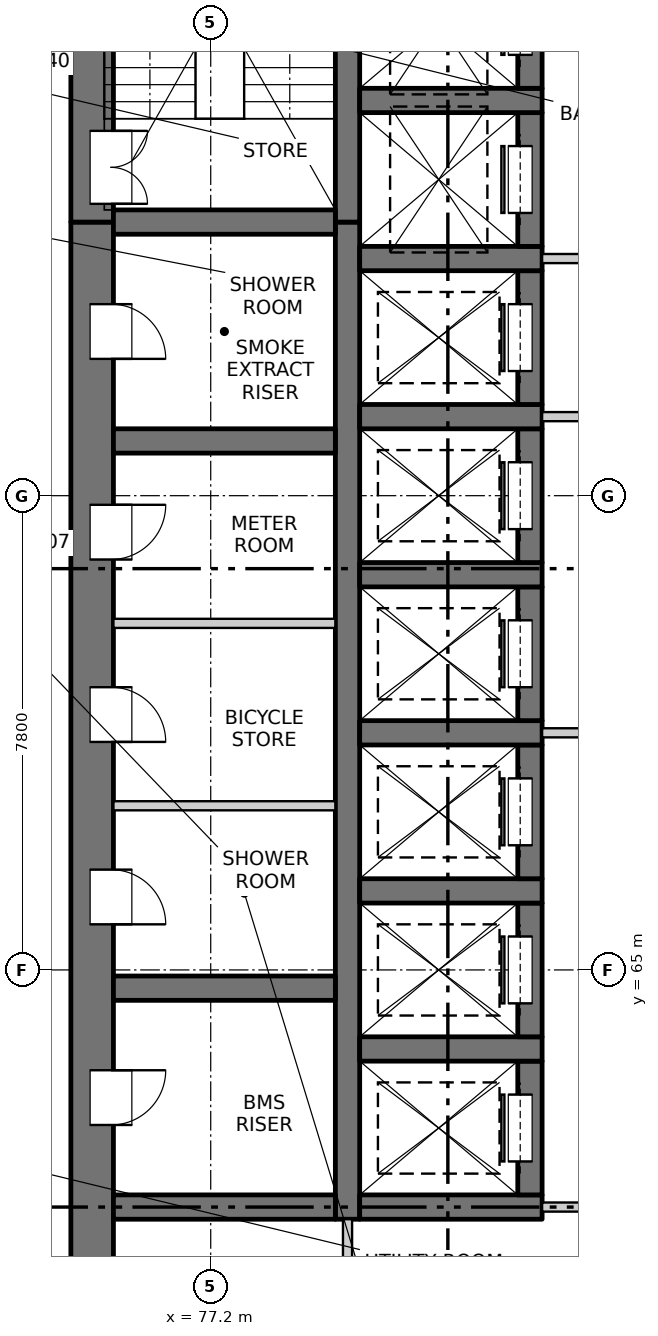
"""IFC4 building model, lengths in metres.
Left out: names, types, materials, properties, quantities, classifications, styles, units other than length and angle.
Written with IfcOpenShell. Run it as: python <this file> out.ifc"""

import sys

from ifc_helpers import new_model, si_unit, direction, frame, frame_2d, origin, place, context, subcontext, project, spatial, rectangle, extrude, element, fill, save


model = new_model("IFC4")
c1 = context("Model", 3, precision=1e-05, world=origin(), true_north=direction((0.0, 1.0)))
c2 = subcontext(c1, "Body", "Model", "MODEL_VIEW")
j1 = project(units=[si_unit("LENGTHUNIT", "METRE"), si_unit("PLANEANGLEUNIT", "RADIAN")], contexts=[c1])
p1 = place(None, origin())
s1 = spatial("IfcSite", under=j1, at=p1, CompositionType="ELEMENT")
p2 = place(p1, origin())
s2 = spatial("IfcBuilding", under=s1, at=p2, CompositionType="ELEMENT")
p3 = place(p2, frame((0.0, 0.0, 29.7)))
s3 = spatial("IfcBuildingStorey", under=s2, at=p3, CompositionType="ELEMENT", Elevation=29.7)
p4 = place(p3, frame((75.25, 54.9, -0.25), z_axis=(0.0, 0.0, 1.0), x_axis=(0.0, 1.0, 0.0)))
e1 = element("IfcWall", 1, at=p4, inside=s3, PredefinedType="SOLIDWALL", context=c2, shape_type="SweptSolid", body=[
    extrude(rectangle(XDim=22.4, YDim=0.7, at=frame_2d((11.2, 0.0))), origin(), (0.0, 0.0, 1.0), 3.4),
])
p5 = place(p4, frame((7.55, 0.0, 0.25)))
e2 = element("IfcOpeningElement", 2, at=p5, cuts=e1, PredefinedType="OPENING", context=c2, shape_type="SweptSolid", body=[
    extrude(rectangle(XDim=0.9, YDim=2.1, at=frame_2d((0.45, 1.05))), frame((0.0, 0.36, 0.0), z_axis=(0.0, -1.0, 0.0), x_axis=(1.0, 0.0, 0.0)), (0.0, 0.0, 1.0), 0.72),
])
p6 = place(p4, frame((10.85, 0.0, 0.25)))
e3 = element("IfcOpeningElement", 3, at=p6, cuts=e1, PredefinedType="OPENING", context=c2, shape_type="SweptSolid", body=[
    extrude(rectangle(XDim=0.9, YDim=2.1, at=frame_2d((0.45, 1.05))), frame((0.0, 0.36, 0.0), z_axis=(0.0, -1.0, 0.0), x_axis=(1.0, 0.0, 0.0)), (0.0, 0.0, 1.0), 0.72),
])
p7 = place(p4, frame((13.85, 0.0, 0.25)))
e4 = element("IfcOpeningElement", 4, at=p7, cuts=e1, PredefinedType="OPENING", context=c2, shape_type="SweptSolid", body=[
    extrude(rectangle(XDim=0.9, YDim=2.1, at=frame_2d((0.45, 1.05))), frame((0.0, 0.36, 0.0), z_axis=(0.0, -1.0, 0.0), x_axis=(1.0, 0.0, 0.0)), (0.0, 0.0, 1.0), 0.72),
])
p8 = place(p4, frame((16.85, 0.0, 0.25)))
e5 = element("IfcOpeningElement", 5, at=p8, cuts=e1, PredefinedType="OPENING", context=c2, shape_type="SweptSolid", body=[
    extrude(rectangle(XDim=0.9, YDim=2.1, at=frame_2d((0.45, 1.05))), frame((0.0, 0.36, 0.0), z_axis=(0.0, -1.0, 0.0), x_axis=(1.0, 0.0, 0.0)), (0.0, 0.0, 1.0), 0.72),
])
p9 = place(p4, frame((20.15, 0.0, 0.25)))
e6 = element("IfcOpeningElement", 6, at=p9, cuts=e1, PredefinedType="OPENING", context=c2, shape_type="SweptSolid", body=[
    extrude(rectangle(XDim=0.9, YDim=2.1, at=frame_2d((0.45, 1.05))), frame((0.0, 0.36, 0.0), z_axis=(0.0, -1.0, 0.0), x_axis=(1.0, 0.0, 0.0)), (0.0, 0.0, 1.0), 0.72),
])
p10 = place(p3, frame((75.25, 77.3, -0.25), z_axis=(0.0, 0.0, 1.0), x_axis=(0.0, 1.0, 0.0)))
e7 = element("IfcWall", 7, at=p10, inside=s3, PredefinedType="SOLIDWALL", context=c2, shape_type="SweptSolid", body=[
    extrude(rectangle(XDim=7.55, YDim=0.7, at=frame_2d((3.775, 0.0))), origin(), (0.0, 0.0, 1.0), 3.4),
])
p11 = place(p10, frame((0.3, 0.0, 0.25)))
e8 = element("IfcOpeningElement", 8, at=p11, cuts=e7, PredefinedType="OPENING", context=c2, shape_type="SweptSolid", body=[
    extrude(rectangle(XDim=1.2, YDim=2.1, at=frame_2d((0.6, 1.05))), frame((0.0, 0.36, 0.0), z_axis=(0.0, -1.0, 0.0), x_axis=(1.0, 0.0, 0.0)), (0.0, 0.0, 1.0), 0.72),
])
p12 = place(p3, frame((79.45, 60.9, -0.25), z_axis=(0.0, 0.0, 1.0), x_axis=(0.0, 1.0, 0.0)))
e9 = element("IfcWall", 9, at=p12, inside=s3, PredefinedType="SOLIDWALL", context=c2, shape_type="SweptSolid", body=[
    extrude(rectangle(XDim=16.4, YDim=0.4, at=frame_2d((8.2, 0.0))), origin(), (0.0, 0.0, 1.0), 3.4),
])
p13 = place(p3, frame((79.45, 77.3, -0.25), z_axis=(0.0, 0.0, 1.0), x_axis=(0.0, 1.0, 0.0)))
e10 = element("IfcWall", 10, at=p13, inside=s3, PredefinedType="SOLIDWALL", context=c2, shape_type="SweptSolid", body=[
    extrude(rectangle(XDim=6.85, YDim=0.4, at=frame_2d((3.425, 0.0))), origin(), (0.0, 0.0, 1.0), 3.4),
])
p14 = place(p3, frame((79.65, 61.1, -0.25), z_axis=(0.0, 0.0, 1.0), x_axis=(1.0, 0.0, 0.0)))
e11 = element("IfcWall", 11, at=p14, inside=s3, PredefinedType="SOLIDWALL", context=c2, shape_type="SweptSolid", body=[
    extrude(rectangle(XDim=3.0, YDim=0.4, at=frame_2d((1.5, 0.0))), origin(), (0.0, 0.0, 1.0), 3.4),
])
p15 = place(p3, frame((82.45, 61.3, -0.25), z_axis=(0.0, 0.0, 1.0), x_axis=(0.0, 1.0, 0.0)))
e12 = element("IfcWall", 12, at=p15, inside=s3, PredefinedType="SOLIDWALL", context=c2, shape_type="SweptSolid", body=[
    extrude(rectangle(XDim=2.2, YDim=0.4, at=frame_2d((1.1, 0.0))), origin(), (0.0, 0.0, 1.0), 3.4),
])
p16 = place(p15, frame((0.55, 0.0, 0.25)))
e13 = element("IfcOpeningElement", 13, at=p16, cuts=e12, PredefinedType="OPENING", context=c2, shape_type="SweptSolid", body=[
    extrude(rectangle(XDim=1.1, YDim=2.1, at=frame_2d((0.55, 1.05))), frame((0.0, 0.21, 0.0), z_axis=(0.0, -1.0, 0.0), x_axis=(1.0, 0.0, 0.0)), (0.0, 0.0, 1.0), 0.42),
])
p17 = place(p3, frame((79.65, 63.7, -0.25), z_axis=(0.0, 0.0, 1.0), x_axis=(1.0, 0.0, 0.0)))
e14 = element("IfcWall", 14, at=p17, inside=s3, PredefinedType="SOLIDWALL", context=c2, shape_type="SweptSolid", body=[
    extrude(rectangle(XDim=3.0, YDim=0.4, at=frame_2d((1.5, 0.0))), origin(), (0.0, 0.0, 1.0), 3.4),
])
p18 = place(p3, frame((82.45, 63.9, -0.25), z_axis=(0.0, 0.0, 1.0), x_axis=(0.0, 1.0, 0.0)))
e15 = element("IfcWall", 15, at=p18, inside=s3, PredefinedType="SOLIDWALL", context=c2, shape_type="SweptSolid", body=[
    extrude(rectangle(XDim=2.2, YDim=0.4, at=frame_2d((1.1, 0.0))), origin(), (0.0, 0.0, 1.0), 3.4),
])
p19 = place(p18, frame((0.55, 0.0, 0.25)))
e16 = element("IfcOpeningElement", 16, at=p19, cuts=e15, PredefinedType="OPENING", context=c2, shape_type="SweptSolid", body=[
    extrude(rectangle(XDim=1.1, YDim=2.1, at=frame_2d((0.55, 1.05))), frame((0.0, 0.21, 0.0), z_axis=(0.0, -1.0, 0.0), x_axis=(1.0, 0.0, 0.0)), (0.0, 0.0, 1.0), 0.42),
])
p20 = place(p3, frame((79.65, 66.3, -0.25), z_axis=(0.0, 0.0, 1.0), x_axis=(1.0, 0.0, 0.0)))
e17 = element("IfcWall", 17, at=p20, inside=s3, PredefinedType="SOLIDWALL", context=c2, shape_type="SweptSolid", body=[
    extrude(rectangle(XDim=3.0, YDim=0.4, at=frame_2d((1.5, 0.0))), origin(), (0.0, 0.0, 1.0), 3.4),
])
p21 = place(p3, frame((82.45, 66.5, -0.25), z_axis=(0.0, 0.0, 1.0), x_axis=(0.0, 1.0, 0.0)))
e18 = element("IfcWall", 18, at=p21, inside=s3, PredefinedType="SOLIDWALL", context=c2, shape_type="SweptSolid", body=[
    extrude(rectangle(XDim=2.2, YDim=0.4, at=frame_2d((1.1, 0.0))), origin(), (0.0, 0.0, 1.0), 3.4),
])
p22 = place(p21, frame((0.55, 0.0, 0.25)))
e19 = element("IfcOpeningElement", 19, at=p22, cuts=e18, PredefinedType="OPENING", context=c2, shape_type="SweptSolid", body=[
    extrude(rectangle(XDim=1.1, YDim=2.1, at=frame_2d((0.55, 1.05))), frame((0.0, 0.21, 0.0), z_axis=(0.0, -1.0, 0.0), x_axis=(1.0, 0.0, 0.0)), (0.0, 0.0, 1.0), 0.42),
])
p23 = place(p3, frame((79.65, 68.9, -0.25), z_axis=(0.0, 0.0, 1.0), x_axis=(1.0, 0.0, 0.0)))
e20 = element("IfcWall", 20, at=p23, inside=s3, PredefinedType="SOLIDWALL", context=c2, shape_type="SweptSolid", body=[
    extrude(rectangle(XDim=3.0, YDim=0.4, at=frame_2d((1.5, 0.0))), origin(), (0.0, 0.0, 1.0), 3.4),
])
p24 = place(p3, frame((82.45, 69.1, -0.25), z_axis=(0.0, 0.0, 1.0), x_axis=(0.0, 1.0, 0.0)))
e21 = element("IfcWall", 21, at=p24, inside=s3, PredefinedType="SOLIDWALL", context=c2, shape_type="SweptSolid", body=[
    extrude(rectangle(XDim=2.2, YDim=0.4, at=frame_2d((1.1, 0.0))), origin(), (0.0, 0.0, 1.0), 3.4),
])
p25 = place(p24, frame((0.55, 0.0, 0.25)))
e22 = element("IfcOpeningElement", 22, at=p25, cuts=e21, PredefinedType="OPENING", context=c2, shape_type="SweptSolid", body=[
    extrude(rectangle(XDim=1.1, YDim=2.1, at=frame_2d((0.55, 1.05))), frame((0.0, 0.21, 0.0), z_axis=(0.0, -1.0, 0.0), x_axis=(1.0, 0.0, 0.0)), (0.0, 0.0, 1.0), 0.42),
])
p26 = place(p3, frame((79.65, 71.5, -0.25), z_axis=(0.0, 0.0, 1.0), x_axis=(1.0, 0.0, 0.0)))
e23 = element("IfcWall", 23, at=p26, inside=s3, PredefinedType="SOLIDWALL", context=c2, shape_type="SweptSolid", body=[
    extrude(rectangle(XDim=3.0, YDim=0.4, at=frame_2d((1.5, 0.0))), origin(), (0.0, 0.0, 1.0), 3.4),
])
p27 = place(p3, frame((82.45, 71.7, -0.25), z_axis=(0.0, 0.0, 1.0), x_axis=(0.0, 1.0, 0.0)))
e24 = element("IfcWall", 24, at=p27, inside=s3, PredefinedType="SOLIDWALL", context=c2, shape_type="SweptSolid", body=[
    extrude(rectangle(XDim=2.2, YDim=0.4, at=frame_2d((1.1, 0.0))), origin(), (0.0, 0.0, 1.0), 3.4),
])
p28 = place(p27, frame((0.55, 0.0, 0.25)))
e25 = element("IfcOpeningElement", 25, at=p28, cuts=e24, PredefinedType="OPENING", context=c2, shape_type="SweptSolid", body=[
    extrude(rectangle(XDim=1.1, YDim=2.1, at=frame_2d((0.55, 1.05))), frame((0.0, 0.21, 0.0), z_axis=(0.0, -1.0, 0.0), x_axis=(1.0, 0.0, 0.0)), (0.0, 0.0, 1.0), 0.42),
])
p29 = place(p3, frame((79.65, 74.1, -0.25), z_axis=(0.0, 0.0, 1.0), x_axis=(1.0, 0.0, 0.0)))
e26 = element("IfcWall", 26, at=p29, inside=s3, PredefinedType="SOLIDWALL", context=c2, shape_type="SweptSolid", body=[
    extrude(rectangle(XDim=3.0, YDim=0.4, at=frame_2d((1.5, 0.0))), origin(), (0.0, 0.0, 1.0), 3.4),
])
p30 = place(p3, frame((82.45, 74.3, -0.25), z_axis=(0.0, 0.0, 1.0), x_axis=(0.0, 1.0, 0.0)))
e27 = element("IfcWall", 27, at=p30, inside=s3, PredefinedType="SOLIDWALL", context=c2, shape_type="SweptSolid", body=[
    extrude(rectangle(XDim=2.2, YDim=0.4, at=frame_2d((1.1, 0.0))), origin(), (0.0, 0.0, 1.0), 3.4),
])
p31 = place(p30, frame((0.55, 0.0, 0.25)))
e28 = element("IfcOpeningElement", 28, at=p31, cuts=e27, PredefinedType="OPENING", context=c2, shape_type="SweptSolid", body=[
    extrude(rectangle(XDim=1.1, YDim=2.1, at=frame_2d((0.55, 1.05))), frame((0.0, 0.21, 0.0), z_axis=(0.0, -1.0, 0.0), x_axis=(1.0, 0.0, 0.0)), (0.0, 0.0, 1.0), 0.42),
])
p32 = place(p3, frame((79.65, 76.7, -0.25), z_axis=(0.0, 0.0, 1.0), x_axis=(1.0, 0.0, 0.0)))
e29 = element("IfcWall", 29, at=p32, inside=s3, PredefinedType="SOLIDWALL", context=c2, shape_type="SweptSolid", body=[
    extrude(rectangle(XDim=3.0, YDim=0.4, at=frame_2d((1.5, 0.0))), origin(), (0.0, 0.0, 1.0), 3.4),
])
p33 = place(p3, frame((82.45, 76.9, -0.25), z_axis=(0.0, 0.0, 1.0), x_axis=(0.0, 1.0, 0.0)))
e30 = element("IfcWall", 30, at=p33, inside=s3, PredefinedType="SOLIDWALL", context=c2, shape_type="SweptSolid", body=[
    extrude(rectangle(XDim=2.2, YDim=0.4, at=frame_2d((1.1, 0.0))), origin(), (0.0, 0.0, 1.0), 3.4),
])
p34 = place(p33, frame((0.55, 0.0, 0.25)))
e31 = element("IfcOpeningElement", 31, at=p34, cuts=e30, PredefinedType="OPENING", context=c2, shape_type="SweptSolid", body=[
    extrude(rectangle(XDim=1.1, YDim=2.1, at=frame_2d((0.55, 1.05))), frame((0.0, 0.21, 0.0), z_axis=(0.0, -1.0, 0.0), x_axis=(1.0, 0.0, 0.0)), (0.0, 0.0, 1.0), 0.42),
])
p35 = place(p3, frame((79.65, 79.3, -0.25), z_axis=(0.0, 0.0, 1.0), x_axis=(1.0, 0.0, 0.0)))
e32 = element("IfcWall", 32, at=p35, inside=s3, PredefinedType="SOLIDWALL", context=c2, shape_type="SweptSolid", body=[
    extrude(rectangle(XDim=3.0, YDim=0.4, at=frame_2d((1.5, 0.0))), origin(), (0.0, 0.0, 1.0), 3.4),
])
p36 = place(p3, frame((82.45, 79.5, -0.25), z_axis=(0.0, 0.0, 1.0), x_axis=(0.0, 1.0, 0.0)))
e33 = element("IfcWall", 33, at=p36, inside=s3, PredefinedType="SOLIDWALL", context=c2, shape_type="SweptSolid", body=[
    extrude(rectangle(XDim=2.2, YDim=0.4, at=frame_2d((1.1, 0.0))), origin(), (0.0, 0.0, 1.0), 3.4),
])
p37 = place(p36, frame((0.55, 0.0, 0.25)))
e34 = element("IfcOpeningElement", 34, at=p37, cuts=e33, PredefinedType="OPENING", context=c2, shape_type="SweptSolid", body=[
    extrude(rectangle(XDim=1.1, YDim=2.1, at=frame_2d((0.55, 1.05))), frame((0.0, 0.21, 0.0), z_axis=(0.0, -1.0, 0.0), x_axis=(1.0, 0.0, 0.0)), (0.0, 0.0, 1.0), 0.42),
])
for number, where, z_axis, x_axis in (
    (35, (75.6, 61.1, -0.25), (0.0, 0.0, 1.0), (1.0, 0.0, 0.0)),
    (36, (75.6, 64.7, -0.25), (0.0, 0.0, 1.0), (1.0, 0.0, 0.0)),
    (37, (75.6, 73.7, -0.25), (0.0, 0.0, 1.0), (1.0, 0.0, 0.0)),
    (38, (75.6, 77.3, -0.25), (0.0, 0.0, 1.0), (1.0, 0.0, 0.0)),
):
    element("IfcWall", number, at=place(p3, frame(where, z_axis=z_axis, x_axis=x_axis)), inside=s3, PredefinedType="SOLIDWALL", context=c2, shape_type="SweptSolid", body=[
        extrude(rectangle(XDim=3.65, YDim=0.4, at=frame_2d((1.825, 0.0))), origin(), (0.0, 0.0, 1.0), 3.4),
    ])
p38 = place(p3, frame((82.65, 61.1, 0.0), z_axis=(0.0, 0.0, 1.0), x_axis=(1.0, 0.0, 0.0)))
e39 = element("IfcWall", 39, at=p38, inside=s3, PredefinedType="PARTITIONING", context=c2, shape_type="SweptSolid", body=[
    extrude(rectangle(XDim=4.7, YDim=0.15, at=frame_2d((2.35, 0.0))), origin(), (0.0, 0.0, 1.0), 3.15),
])
p39 = place(p38, frame((1.45, 0.0, 0.0)))
e40 = element("IfcOpeningElement", 40, at=p39, cuts=e39, PredefinedType="OPENING", context=c2, shape_type="SweptSolid", body=[
    extrude(rectangle(XDim=1.8, YDim=2.1, at=frame_2d((0.9, 1.05))), frame((0.0, 0.085, 0.0), z_axis=(0.0, -1.0, 0.0), x_axis=(1.0, 0.0, 0.0)), (0.0, 0.0, 1.0), 0.17),
])
p40 = place(p3, frame((75.6, 67.7, 0.0), z_axis=(0.0, 0.0, 1.0), x_axis=(1.0, 0.0, 0.0)))
e41 = element("IfcWall", 41, at=p40, inside=s3, PredefinedType="PARTITIONING", context=c2, shape_type="SweptSolid", body=[
    extrude(rectangle(XDim=3.65, YDim=0.15, at=frame_2d((1.825, 0.0))), origin(), (0.0, 0.0, 1.0), 3.15),
])
p41 = place(p3, frame((82.65, 68.9, 0.0), z_axis=(0.0, 0.0, 1.0), x_axis=(1.0, 0.0, 0.0)))
e42 = element("IfcWall", 42, at=p41, inside=s3, PredefinedType="PARTITIONING", context=c2, shape_type="SweptSolid", body=[
    extrude(rectangle(XDim=4.7, YDim=0.15, at=frame_2d((2.35, 0.0))), origin(), (0.0, 0.0, 1.0), 3.15),
])
p42 = place(p41, frame((1.45, 0.0, 0.0)))
e43 = element("IfcOpeningElement", 43, at=p42, cuts=e42, PredefinedType="OPENING", context=c2, shape_type="SweptSolid", body=[
    extrude(rectangle(XDim=1.8, YDim=2.1, at=frame_2d((0.9, 1.05))), frame((0.0, 0.085, 0.0), z_axis=(0.0, -1.0, 0.0), x_axis=(1.0, 0.0, 0.0)), (0.0, 0.0, 1.0), 0.17),
])
p43 = place(p3, frame((75.6, 70.7, 0.0), z_axis=(0.0, 0.0, 1.0), x_axis=(1.0, 0.0, 0.0)))
e44 = element("IfcWall", 44, at=p43, inside=s3, PredefinedType="PARTITIONING", context=c2, shape_type="SweptSolid", body=[
    extrude(rectangle(XDim=3.65, YDim=0.15, at=frame_2d((1.825, 0.0))), origin(), (0.0, 0.0, 1.0), 3.15),
])
p44 = place(p3, frame((82.65, 74.1, 0.0), z_axis=(0.0, 0.0, 1.0), x_axis=(1.0, 0.0, 0.0)))
e45 = element("IfcWall", 45, at=p44, inside=s3, PredefinedType="PARTITIONING", context=c2, shape_type="SweptSolid", body=[
    extrude(rectangle(XDim=4.7, YDim=0.15, at=frame_2d((2.35, 0.0))), origin(), (0.0, 0.0, 1.0), 3.15),
])
p45 = place(p44, frame((1.45, 0.0, 0.0)))
e46 = element("IfcOpeningElement", 46, at=p45, cuts=e45, PredefinedType="OPENING", context=c2, shape_type="SweptSolid", body=[
    extrude(rectangle(XDim=1.8, YDim=2.1, at=frame_2d((0.9, 1.05))), frame((0.0, 0.085, 0.0), z_axis=(0.0, -1.0, 0.0), x_axis=(1.0, 0.0, 0.0)), (0.0, 0.0, 1.0), 0.17),
])
p46 = place(p3, frame((82.65, 76.7, 0.0), z_axis=(0.0, 0.0, 1.0), x_axis=(1.0, 0.0, 0.0)))
e47 = element("IfcWall", 47, at=p46, inside=s3, PredefinedType="PARTITIONING", context=c2, shape_type="SweptSolid", body=[
    extrude(rectangle(XDim=4.7, YDim=0.15, at=frame_2d((2.35, 0.0))), origin(), (0.0, 0.0, 1.0), 3.15),
])
p47 = place(p46, frame((1.45, 0.0, 0.0)))
e48 = element("IfcOpeningElement", 48, at=p47, cuts=e47, PredefinedType="OPENING", context=c2, shape_type="SweptSolid", body=[
    extrude(rectangle(XDim=1.8, YDim=2.1, at=frame_2d((0.9, 1.05))), frame((0.0, 0.085, 0.0), z_axis=(0.0, -1.0, 0.0), x_axis=(1.0, 0.0, 0.0)), (0.0, 0.0, 1.0), 0.17),
])
p48 = place(p3, frame((79.45, 55.6, 0.0), z_axis=(0.0, 0.0, 1.0), x_axis=(0.0, 1.0, 0.0)))
e49 = element("IfcWall", 49, at=p48, inside=s3, PredefinedType="PARTITIONING", context=c2, shape_type="SweptSolid", body=[
    extrude(rectangle(XDim=5.3, YDim=0.15, at=frame_2d((2.65, 0.0))), origin(), (0.0, 0.0, 1.0), 3.15),
])
p49 = place(p48, frame((2.1, 0.0, 0.0)))
e50 = element("IfcOpeningElement", 50, at=p49, cuts=e49, PredefinedType="OPENING", context=c2, shape_type="SweptSolid", body=[
    extrude(rectangle(XDim=0.9, YDim=2.1, at=frame_2d((0.45, 1.05))), frame((0.0, 0.085, 0.0), z_axis=(0.0, -1.0, 0.0), x_axis=(1.0, 0.0, 0.0)), (0.0, 0.0, 1.0), 0.17),
])
p50 = place(p16, origin())
e51 = element("IfcDoor", 51, at=p50, inside=s3, OperationType="SLIDING_TO_RIGHT", PredefinedType="DOOR", context=c2, shape_type="SweptSolid", body=[
    extrude(rectangle(XDim=1.1, YDim=2.1, at=frame_2d((0.55, 1.05))), frame((0.0, 0.185, 0.0), z_axis=(0.0, -1.0, 0.0), x_axis=(1.0, 0.0, 0.0)), (0.0, 0.0, 1.0), 0.05),
])
fill(e13, e51)
p51 = place(p5, origin())
e52 = element("IfcDoor", 52, at=p51, inside=s3, OperationType="SINGLE_SWING_LEFT", PredefinedType="DOOR", context=c2, shape_type="SweptSolid", body=[
    extrude(rectangle(XDim=0.9, YDim=2.1, at=frame_2d((0.45, 1.05))), frame((0.0, -0.285, 0.0), z_axis=(0.0, -1.0, 0.0), x_axis=(1.0, 0.0, 0.0)), (0.0, 0.0, 1.0), 0.05),
])
fill(e2, e52)
p52 = place(p19, origin())
e53 = element("IfcDoor", 53, at=p52, inside=s3, OperationType="SLIDING_TO_RIGHT", PredefinedType="DOOR", context=c2, shape_type="SweptSolid", body=[
    extrude(rectangle(XDim=1.1, YDim=2.1, at=frame_2d((0.55, 1.05))), frame((0.0, 0.185, 0.0), z_axis=(0.0, -1.0, 0.0), x_axis=(1.0, 0.0, 0.0)), (0.0, 0.0, 1.0), 0.05),
])
fill(e16, e53)
p53 = place(p6, origin())
e54 = element("IfcDoor", 54, at=p53, inside=s3, OperationType="SINGLE_SWING_RIGHT", PredefinedType="DOOR", context=c2, shape_type="SweptSolid", body=[
    extrude(rectangle(XDim=0.9, YDim=2.1, at=frame_2d((0.45, 1.05))), frame((0.0, -0.285, 0.0), z_axis=(0.0, -1.0, 0.0), x_axis=(1.0, 0.0, 0.0)), (0.0, 0.0, 1.0), 0.05),
])
fill(e3, e54)
p54 = place(p22, origin())
e55 = element("IfcDoor", 55, at=p54, inside=s3, OperationType="SLIDING_TO_RIGHT", PredefinedType="DOOR", context=c2, shape_type="SweptSolid", body=[
    extrude(rectangle(XDim=1.1, YDim=2.1, at=frame_2d((0.55, 1.05))), frame((0.0, 0.185, 0.0), z_axis=(0.0, -1.0, 0.0), x_axis=(1.0, 0.0, 0.0)), (0.0, 0.0, 1.0), 0.05),
])
fill(e19, e55)
p55 = place(p7, origin())
e56 = element("IfcDoor", 56, at=p55, inside=s3, OperationType="SINGLE_SWING_RIGHT", PredefinedType="DOOR", context=c2, shape_type="SweptSolid", body=[
    extrude(rectangle(XDim=0.9, YDim=2.1, at=frame_2d((0.45, 1.05))), frame((0.0, -0.285, 0.0), z_axis=(0.0, -1.0, 0.0), x_axis=(1.0, 0.0, 0.0)), (0.0, 0.0, 1.0), 0.05),
])
fill(e4, e56)
p56 = place(p25, origin())
e57 = element("IfcDoor", 57, at=p56, inside=s3, OperationType="SLIDING_TO_LEFT", PredefinedType="DOOR", context=c2, shape_type="SweptSolid", body=[
    extrude(rectangle(XDim=1.1, YDim=2.1, at=frame_2d((0.55, 1.05))), frame((0.0, 0.185, 0.0), z_axis=(0.0, -1.0, 0.0), x_axis=(1.0, 0.0, 0.0)), (0.0, 0.0, 1.0), 0.05),
])
fill(e22, e57)
p57 = place(p8, origin())
e58 = element("IfcDoor", 58, at=p57, inside=s3, OperationType="SINGLE_SWING_LEFT", PredefinedType="DOOR", context=c2, shape_type="SweptSolid", body=[
    extrude(rectangle(XDim=0.9, YDim=2.1, at=frame_2d((0.45, 1.05))), frame((0.0, -0.285, 0.0), z_axis=(0.0, -1.0, 0.0), x_axis=(1.0, 0.0, 0.0)), (0.0, 0.0, 1.0), 0.05),
])
fill(e5, e58)
p58 = place(p28, origin())
e59 = element("IfcDoor", 59, at=p58, inside=s3, OperationType="SLIDING_TO_LEFT", PredefinedType="DOOR", context=c2, shape_type="SweptSolid", body=[
    extrude(rectangle(XDim=1.1, YDim=2.1, at=frame_2d((0.55, 1.05))), frame((0.0, 0.185, 0.0), z_axis=(0.0, -1.0, 0.0), x_axis=(1.0, 0.0, 0.0)), (0.0, 0.0, 1.0), 0.05),
])
fill(e25, e59)
p59 = place(p31, origin())
e60 = element("IfcDoor", 60, at=p59, inside=s3, OperationType="SLIDING_TO_LEFT", PredefinedType="DOOR", context=c2, shape_type="SweptSolid", body=[
    extrude(rectangle(XDim=1.1, YDim=2.1, at=frame_2d((0.55, 1.05))), frame((0.0, 0.185, 0.0), z_axis=(0.0, -1.0, 0.0), x_axis=(1.0, 0.0, 0.0)), (0.0, 0.0, 1.0), 0.05),
])
fill(e28, e60)
p60 = place(p9, origin())
e61 = element("IfcDoor", 61, at=p60, inside=s3, OperationType="SINGLE_SWING_RIGHT", PredefinedType="DOOR", context=c2, shape_type="SweptSolid", body=[
    extrude(rectangle(XDim=0.9, YDim=2.1, at=frame_2d((0.45, 1.05))), frame((0.0, -0.285, 0.0), z_axis=(0.0, -1.0, 0.0), x_axis=(1.0, 0.0, 0.0)), (0.0, 0.0, 1.0), 0.05),
])
fill(e6, e61)
p61 = place(p34, origin())
e62 = element("IfcDoor", 62, at=p61, inside=s3, OperationType="SLIDING_TO_LEFT", PredefinedType="DOOR", context=c2, shape_type="SweptSolid", body=[
    extrude(rectangle(XDim=1.1, YDim=2.1, at=frame_2d((0.55, 1.05))), frame((0.0, 0.185, 0.0), z_axis=(0.0, -1.0, 0.0), x_axis=(1.0, 0.0, 0.0)), (0.0, 0.0, 1.0), 0.05),
])
fill(e31, e62)
p62 = place(p11, origin())
e63 = element("IfcDoor", 63, at=p62, inside=s3, OperationType="DOUBLE_DOOR_SINGLE_SWING", PredefinedType="DOOR", context=c2, shape_type="SweptSolid", body=[
    extrude(rectangle(XDim=1.2, YDim=2.1, at=frame_2d((0.6, 1.05))), frame((0.0, -0.285, 0.0), z_axis=(0.0, -1.0, 0.0), x_axis=(1.0, 0.0, 0.0)), (0.0, 0.0, 1.0), 0.05),
])
fill(e8, e63)
p63 = place(p37, origin())
e64 = element("IfcDoor", 64, at=p63, inside=s3, OperationType="SLIDING_TO_LEFT", PredefinedType="DOOR", context=c2, shape_type="SweptSolid", body=[
    extrude(rectangle(XDim=1.1, YDim=2.1, at=frame_2d((0.55, 1.05))), frame((0.0, 0.185, 0.0), z_axis=(0.0, -1.0, 0.0), x_axis=(1.0, 0.0, 0.0)), (0.0, 0.0, 1.0), 0.05),
])
fill(e34, e64)
save(model, sys.argv[1])
